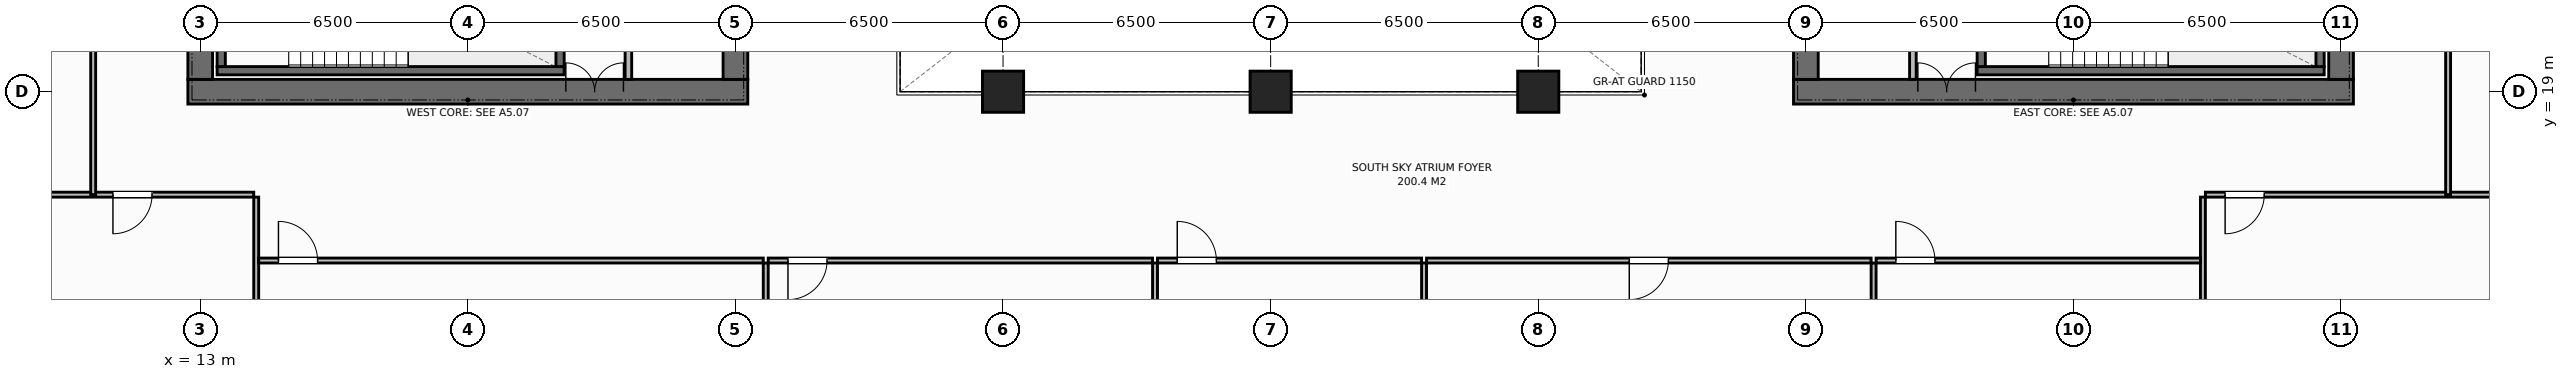
"""IFC4 building model, lengths in metres.
Left out: names, types, materials, properties, quantities, classifications, styles, units other than length and angle.
Written with IfcOpenShell. Run it as: python <this file> out.ifc"""

import sys

from ifc_helpers import new_model, si_unit, direction, frame, frame_2d, origin, origin_2d, place, context, subcontext, project, spatial, rectangle, extrude, element, fill, save


model = new_model("IFC4")
c1 = context("Model", 3, precision=1e-05, world=origin(), true_north=direction((0.0, 1.0)))
c2 = subcontext(c1, "Body", "Model", "MODEL_VIEW")
j1 = project(units=[si_unit("LENGTHUNIT", "METRE"), si_unit("PLANEANGLEUNIT", "RADIAN")], contexts=[c1])
p1 = place(None, origin())
s1 = spatial("IfcSite", under=j1, at=p1, CompositionType="ELEMENT")
p2 = place(p1, origin())
s2 = spatial("IfcBuilding", under=s1, at=p2, CompositionType="ELEMENT")
p3 = place(p2, frame((0.0, 0.0, 167.0)))
s3 = spatial("IfcBuildingStorey", under=s2, at=p3, CompositionType="ELEMENT", Elevation=167.0)
p4 = place(p3, frame((12.7, 19.0, 0.0), z_axis=(0.0, 0.0, 1.0), x_axis=(1.0, 0.0, 0.0)))
e1 = element("IfcWall", 1, at=p4, inside=s3, PredefinedType="SHEAR", context=c2, shape_type="SweptSolid", body=[
    extrude(rectangle(XDim=13.6, YDim=0.6, at=frame_2d((6.8, 0.0))), origin(), (0.0, 0.0, 1.0), 3.8),
])
p5 = place(p4, frame((9.18, 0.0, 0.0)))
e2 = element("IfcOpeningElement", 2, at=p5, cuts=e1, PredefinedType="OPENING", context=c2, shape_type="SweptSolid", body=[
    extrude(rectangle(XDim=1.4, YDim=2.2, at=frame_2d((0.7, 1.1))), frame((0.0, 0.31, 0.0), z_axis=(0.0, -1.0, 0.0), x_axis=(1.0, 0.0, 0.0)), (0.0, 0.0, 1.0), 0.62),
])
p6 = place(p3, frame((13.0, 19.3, 0.0), z_axis=(0.0, 0.0, 1.0), x_axis=(0.0, 1.0, 0.0)))
e3 = element("IfcWall", 3, at=p6, inside=s3, PredefinedType="SHEAR", context=c2, shape_type="SweptSolid", body=[
    extrude(rectangle(XDim=13.4, YDim=0.6, at=frame_2d((6.7, 0.0))), origin(), (0.0, 0.0, 1.0), 3.8),
])
p7 = place(p6, frame((4.75, 0.0, 0.0)))
e4 = element("IfcOpeningElement", 4, at=p7, cuts=e3, PredefinedType="OPENING", context=c2, shape_type="SweptSolid", body=[
    extrude(rectangle(XDim=1.4, YDim=2.2, at=frame_2d((0.7, 1.1))), frame((0.0, 0.31, 0.0), z_axis=(0.0, -1.0, 0.0), x_axis=(1.0, 0.0, 0.0)), (0.0, 0.0, 1.0), 0.62),
])
p8 = place(p3, frame((26.0, 19.3, 0.0), z_axis=(0.0, 0.0, 1.0), x_axis=(0.0, 1.0, 0.0)))
e5 = element("IfcWall", 5, at=p8, inside=s3, PredefinedType="SHEAR", context=c2, shape_type="SweptSolid", body=[
    extrude(rectangle(XDim=13.4, YDim=0.6, at=frame_2d((6.7, 0.0))), origin(), (0.0, 0.0, 1.0), 3.8),
])
p9 = place(p3, frame((51.7, 19.0, 0.0), z_axis=(0.0, 0.0, 1.0), x_axis=(1.0, 0.0, 0.0)))
e6 = element("IfcWall", 6, at=p9, inside=s3, PredefinedType="SHEAR", context=c2, shape_type="SweptSolid", body=[
    extrude(rectangle(XDim=13.6, YDim=0.6, at=frame_2d((6.8, 0.0))), origin(), (0.0, 0.0, 1.0), 3.8),
])
p10 = place(p9, frame((3.02, 0.0, 0.0)))
e7 = element("IfcOpeningElement", 7, at=p10, cuts=e6, PredefinedType="OPENING", context=c2, shape_type="SweptSolid", body=[
    extrude(rectangle(XDim=1.4, YDim=2.2, at=frame_2d((0.7, 1.1))), frame((0.0, 0.31, 0.0), z_axis=(0.0, -1.0, 0.0), x_axis=(1.0, 0.0, 0.0)), (0.0, 0.0, 1.0), 0.62),
])
p11 = place(p3, frame((52.0, 19.3, 0.0), z_axis=(0.0, 0.0, 1.0), x_axis=(0.0, 1.0, 0.0)))
e8 = element("IfcWall", 8, at=p11, inside=s3, PredefinedType="SHEAR", context=c2, shape_type="SweptSolid", body=[
    extrude(rectangle(XDim=13.4, YDim=0.6, at=frame_2d((6.7, 0.0))), origin(), (0.0, 0.0, 1.0), 3.8),
])
p12 = place(p3, frame((65.0, 19.3, 0.0), z_axis=(0.0, 0.0, 1.0), x_axis=(0.0, 1.0, 0.0)))
e9 = element("IfcWall", 9, at=p12, inside=s3, PredefinedType="SHEAR", context=c2, shape_type="SweptSolid", body=[
    extrude(rectangle(XDim=13.4, YDim=0.6, at=frame_2d((6.7, 0.0))), origin(), (0.0, 0.0, 1.0), 3.8),
])
p13 = place(p12, frame((8.15, 0.0, 0.0)))
e10 = element("IfcOpeningElement", 10, at=p13, cuts=e9, PredefinedType="OPENING", context=c2, shape_type="SweptSolid", body=[
    extrude(rectangle(XDim=1.3, YDim=2.2, at=frame_2d((0.65, 1.1))), frame((0.0, 0.31, 0.0), z_axis=(0.0, -1.0, 0.0), x_axis=(1.0, 0.0, 0.0)), (0.0, 0.0, 1.0), 0.62),
])
p14 = place(p3, frame((13.41, 19.51, 0.0), z_axis=(0.0, 0.0, 1.0), x_axis=(1.0, 0.0, 0.0)))
e11 = element("IfcWall", 11, at=p14, inside=s3, PredefinedType="SHEAR", context=c2, shape_type="SweptSolid", body=[
    extrude(rectangle(XDim=8.43, YDim=0.2, at=frame_2d((4.215, 0.0))), origin(), (0.0, 0.0, 1.0), 3.8),
])
for number, where, z_axis, x_axis in (
    (12, (13.51, 19.61, 0.0), (0.0, 0.0, 1.0), (0.0, 1.0, 0.0)),
    (13, (21.74, 19.61, 0.0), (0.0, 0.0, 1.0), (0.0, 1.0, 0.0)),
):
    element("IfcWall", number, at=place(p3, frame(where, z_axis=z_axis, x_axis=x_axis)), inside=s3, PredefinedType="SHEAR", context=c2, shape_type="SweptSolid", body=[
        extrude(rectangle(XDim=3.28, YDim=0.2, at=frame_2d((1.64, 0.0))), origin(), (0.0, 0.0, 1.0), 3.8),
    ])
p15 = place(p3, frame((56.16, 19.51, 0.0), z_axis=(0.0, 0.0, 1.0), x_axis=(1.0, 0.0, 0.0)))
e14 = element("IfcWall", 14, at=p15, inside=s3, PredefinedType="SHEAR", context=c2, shape_type="SweptSolid", body=[
    extrude(rectangle(XDim=8.43, YDim=0.2, at=frame_2d((4.215, 0.0))), origin(), (0.0, 0.0, 1.0), 3.8),
])
for number, where, z_axis, x_axis in (
    (15, (56.26, 19.61, 0.0), (0.0, 0.0, 1.0), (0.0, 1.0, 0.0)),
    (16, (64.49, 19.61, 0.0), (0.0, 0.0, 1.0), (0.0, 1.0, 0.0)),
):
    element("IfcWall", number, at=place(p3, frame(where, z_axis=z_axis, x_axis=x_axis)), inside=s3, PredefinedType="SHEAR", context=c2, shape_type="SweptSolid", body=[
        extrude(rectangle(XDim=3.28, YDim=0.2, at=frame_2d((1.64, 0.0))), origin(), (0.0, 0.0, 1.0), 3.8),
    ])
for number, where, z_axis, x_axis in (
    (17, (32.5, 19.0, 0.0), (0.0, 0.0, 1.0), (1.0, 0.0, 0.0)),
    (18, (39.0, 19.0, 0.0), (0.0, 0.0, 1.0), (1.0, 0.0, 0.0)),
    (19, (45.5, 19.0, 0.0), (0.0, 0.0, 1.0), (1.0, 0.0, 0.0)),
):
    element("IfcColumn", number, at=place(p3, frame(where, z_axis=z_axis, x_axis=x_axis)), inside=s3, PredefinedType="COLUMN", context=c2, shape_type="SweptSolid", body=[
        extrude(rectangle(XDim=1.0, YDim=1.0, at=origin_2d()), origin(), (0.0, 0.0, 1.0), 3.8),
    ])
p16 = place(p3, frame((23.4, 19.3, 0.0), z_axis=(0.0, 0.0, 1.0), x_axis=(0.0, 1.0, 0.0)))
e20 = element("IfcWall", 20, at=p16, inside=s3, PredefinedType="STANDARD", context=c2, shape_type="SweptSolid", body=[
    extrude(rectangle(XDim=13.4, YDim=0.16, at=frame_2d((6.7, 0.0))), origin(), (0.0, 0.0, 1.0), 3.572),
])
p17 = place(p16, frame((2.2, 0.0, 0.0)))
e21 = element("IfcOpeningElement", 21, at=p17, cuts=e20, PredefinedType="OPENING", context=c2, shape_type="SweptSolid", body=[
    extrude(rectangle(XDim=0.95, YDim=2.15, at=frame_2d((0.475, 1.075))), frame((0.0, 0.09, 0.0), z_axis=(0.0, -1.0, 0.0), x_axis=(1.0, 0.0, 0.0)), (0.0, 0.0, 1.0), 0.18),
])
p18 = place(p16, frame((6.3, 0.0, 0.0)))
e22 = element("IfcOpeningElement", 22, at=p18, cuts=e20, PredefinedType="OPENING", context=c2, shape_type="SweptSolid", body=[
    extrude(rectangle(XDim=0.95, YDim=2.15, at=frame_2d((0.475, 1.075))), frame((0.0, 0.09, 0.0), z_axis=(0.0, -1.0, 0.0), x_axis=(1.0, 0.0, 0.0)), (0.0, 0.0, 1.0), 0.18),
])
p19 = place(p16, frame((9.3, 0.0, 0.0)))
e23 = element("IfcOpeningElement", 23, at=p19, cuts=e20, PredefinedType="OPENING", context=c2, shape_type="SweptSolid", body=[
    extrude(rectangle(XDim=1.1, YDim=2.2, at=frame_2d((0.55, 1.1))), frame((0.0, 0.09, 0.0), z_axis=(0.0, -1.0, 0.0), x_axis=(1.0, 0.0, 0.0)), (0.0, 0.0, 1.0), 0.18),
])
p20 = place(p16, frame((11.5, 0.0, 0.0)))
e24 = element("IfcOpeningElement", 24, at=p20, cuts=e20, PredefinedType="OPENING", context=c2, shape_type="SweptSolid", body=[
    extrude(rectangle(XDim=1.1, YDim=2.2, at=frame_2d((0.55, 1.1))), frame((0.0, 0.09, 0.0), z_axis=(0.0, -1.0, 0.0), x_axis=(1.0, 0.0, 0.0)), (0.0, 0.0, 1.0), 0.18),
])
p21 = place(p3, frame((54.6, 19.3, 0.0), z_axis=(0.0, 0.0, 1.0), x_axis=(0.0, 1.0, 0.0)))
e25 = element("IfcWall", 25, at=p21, inside=s3, PredefinedType="STANDARD", context=c2, shape_type="SweptSolid", body=[
    extrude(rectangle(XDim=13.4, YDim=0.16, at=frame_2d((6.7, 0.0))), origin(), (0.0, 0.0, 1.0), 3.572),
])
p22 = place(p21, frame((2.1, 0.0, 0.0)))
e26 = element("IfcOpeningElement", 26, at=p22, cuts=e25, PredefinedType="OPENING", context=c2, shape_type="SweptSolid", body=[
    extrude(rectangle(XDim=0.95, YDim=2.15, at=frame_2d((0.475, 1.075))), frame((0.0, 0.09, 0.0), z_axis=(0.0, -1.0, 0.0), x_axis=(1.0, 0.0, 0.0)), (0.0, 0.0, 1.0), 0.18),
])
p23 = place(p21, frame((6.2, 0.0, 0.0)))
e27 = element("IfcOpeningElement", 27, at=p23, cuts=e25, PredefinedType="OPENING", context=c2, shape_type="SweptSolid", body=[
    extrude(rectangle(XDim=0.95, YDim=2.15, at=frame_2d((0.475, 1.075))), frame((0.0, 0.09, 0.0), z_axis=(0.0, -1.0, 0.0), x_axis=(1.0, 0.0, 0.0)), (0.0, 0.0, 1.0), 0.18),
])
p24 = place(p21, frame((9.3, 0.0, 0.0)))
e28 = element("IfcOpeningElement", 28, at=p24, cuts=e25, PredefinedType="OPENING", context=c2, shape_type="SweptSolid", body=[
    extrude(rectangle(XDim=1.1, YDim=2.2, at=frame_2d((0.55, 1.1))), frame((0.0, 0.09, 0.0), z_axis=(0.0, -1.0, 0.0), x_axis=(1.0, 0.0, 0.0)), (0.0, 0.0, 1.0), 0.18),
])
p25 = place(p21, frame((11.5, 0.0, 0.0)))
e29 = element("IfcOpeningElement", 29, at=p25, cuts=e25, PredefinedType="OPENING", context=c2, shape_type="SweptSolid", body=[
    extrude(rectangle(XDim=1.1, YDim=2.2, at=frame_2d((0.55, 1.1))), frame((0.0, 0.09, 0.0), z_axis=(0.0, -1.0, 0.0), x_axis=(1.0, 0.0, 0.0)), (0.0, 0.0, 1.0), 0.18),
])
p26 = place(p3, frame((14.36, 3.42, 0.0), z_axis=(0.0, 0.0, 1.0), x_axis=(0.0, 1.0, 0.0)))
e30 = element("IfcWall", 30, at=p26, inside=s3, PredefinedType="PARTITIONING", context=c2, shape_type="SweptSolid", body=[
    extrude(rectangle(XDim=13.02, YDim=0.12, at=frame_2d((6.51, 0.0))), origin(), (0.0, 0.0, 1.0), 3.572),
])
p27 = place(p3, frame((3.98, 16.5, 0.0), z_axis=(0.0, 0.0, 1.0), x_axis=(1.0, 0.0, 0.0)))
e31 = element("IfcWall", 31, at=p27, inside=s3, PredefinedType="PARTITIONING", context=c2, shape_type="SweptSolid", body=[
    extrude(rectangle(XDim=10.32, YDim=0.12, at=frame_2d((5.16, 0.0))), origin(), (0.0, 0.0, 1.0), 3.572),
])
p28 = place(p27, frame((6.9, 0.0, 0.0)))
e32 = element("IfcOpeningElement", 32, at=p28, cuts=e31, PredefinedType="OPENING", context=c2, shape_type="SweptSolid", body=[
    extrude(rectangle(XDim=0.95, YDim=2.15, at=frame_2d((0.475, 1.075))), frame((0.0, 0.07, 0.0), z_axis=(0.0, -1.0, 0.0), x_axis=(1.0, 0.0, 0.0)), (0.0, 0.0, 1.0), 0.14),
])
p29 = place(p3, frame((26.736, 3.42, 0.0), z_axis=(0.0, 0.0, 1.0), x_axis=(0.0, 1.0, 0.0)))
e33 = element("IfcWall", 33, at=p29, inside=s3, PredefinedType="PARTITIONING", context=c2, shape_type="SweptSolid", body=[
    extrude(rectangle(XDim=11.42, YDim=0.12, at=frame_2d((5.71, 0.0))), origin(), (0.0, 0.0, 1.0), 3.572),
])
p30 = place(p3, frame((14.42, 14.9, 0.0), z_axis=(0.0, 0.0, 1.0), x_axis=(1.0, 0.0, 0.0)))
e34 = element("IfcWall", 34, at=p30, inside=s3, PredefinedType="PARTITIONING", context=c2, shape_type="SweptSolid", body=[
    extrude(rectangle(XDim=12.256, YDim=0.12, at=frame_2d((6.128, 0.0))), origin(), (0.0, 0.0, 1.0), 3.572),
])
p31 = place(p30, frame((0.48, 0.0, 0.0)))
e35 = element("IfcOpeningElement", 35, at=p31, cuts=e34, PredefinedType="OPENING", context=c2, shape_type="SweptSolid", body=[
    extrude(rectangle(XDim=0.95, YDim=2.15, at=frame_2d((0.475, 1.075))), frame((0.0, 0.07, 0.0), z_axis=(0.0, -1.0, 0.0), x_axis=(1.0, 0.0, 0.0)), (0.0, 0.0, 1.0), 0.14),
])
p32 = place(p3, frame((36.191, 3.42, 0.0), z_axis=(0.0, 0.0, 1.0), x_axis=(0.0, 1.0, 0.0)))
e36 = element("IfcWall", 36, at=p32, inside=s3, PredefinedType="PARTITIONING", context=c2, shape_type="SweptSolid", body=[
    extrude(rectangle(XDim=11.42, YDim=0.12, at=frame_2d((5.71, 0.0))), origin(), (0.0, 0.0, 1.0), 3.572),
])
p33 = place(p3, frame((26.796, 14.9, 0.0), z_axis=(0.0, 0.0, 1.0), x_axis=(1.0, 0.0, 0.0)))
e37 = element("IfcWall", 37, at=p33, inside=s3, PredefinedType="PARTITIONING", context=c2, shape_type="SweptSolid", body=[
    extrude(rectangle(XDim=9.335, YDim=0.12, at=frame_2d((4.668, 0.0))), origin(), (0.0, 0.0, 1.0), 3.572),
])
p34 = place(p33, frame((0.48, 0.0, 0.0)))
e38 = element("IfcOpeningElement", 38, at=p34, cuts=e37, PredefinedType="OPENING", context=c2, shape_type="SweptSolid", body=[
    extrude(rectangle(XDim=0.95, YDim=2.15, at=frame_2d((0.475, 1.075))), frame((0.0, 0.07, 0.0), z_axis=(0.0, -1.0, 0.0), x_axis=(1.0, 0.0, 0.0)), (0.0, 0.0, 1.0), 0.14),
])
p35 = place(p3, frame((42.726, 3.42, 0.0), z_axis=(0.0, 0.0, 1.0), x_axis=(0.0, 1.0, 0.0)))
e39 = element("IfcWall", 39, at=p35, inside=s3, PredefinedType="PARTITIONING", context=c2, shape_type="SweptSolid", body=[
    extrude(rectangle(XDim=11.42, YDim=0.12, at=frame_2d((5.71, 0.0))), origin(), (0.0, 0.0, 1.0), 3.572),
])
p36 = place(p3, frame((36.251, 14.9, 0.0), z_axis=(0.0, 0.0, 1.0), x_axis=(1.0, 0.0, 0.0)))
e40 = element("IfcWall", 40, at=p36, inside=s3, PredefinedType="PARTITIONING", context=c2, shape_type="SweptSolid", body=[
    extrude(rectangle(XDim=6.415, YDim=0.12, at=frame_2d((3.207, 0.0))), origin(), (0.0, 0.0, 1.0), 3.572),
])
p37 = place(p36, frame((0.48, 0.0, 0.0)))
e41 = element("IfcOpeningElement", 41, at=p37, cuts=e40, PredefinedType="OPENING", context=c2, shape_type="SweptSolid", body=[
    extrude(rectangle(XDim=0.95, YDim=2.15, at=frame_2d((0.475, 1.075))), frame((0.0, 0.07, 0.0), z_axis=(0.0, -1.0, 0.0), x_axis=(1.0, 0.0, 0.0)), (0.0, 0.0, 1.0), 0.14),
])
p38 = place(p3, frame((53.646, 3.42, 0.0), z_axis=(0.0, 0.0, 1.0), x_axis=(0.0, 1.0, 0.0)))
e42 = element("IfcWall", 42, at=p38, inside=s3, PredefinedType="PARTITIONING", context=c2, shape_type="SweptSolid", body=[
    extrude(rectangle(XDim=11.42, YDim=0.12, at=frame_2d((5.71, 0.0))), origin(), (0.0, 0.0, 1.0), 3.572),
])
p39 = place(p3, frame((42.786, 14.9, 0.0), z_axis=(0.0, 0.0, 1.0), x_axis=(1.0, 0.0, 0.0)))
e43 = element("IfcWall", 43, at=p39, inside=s3, PredefinedType="PARTITIONING", context=c2, shape_type="SweptSolid", body=[
    extrude(rectangle(XDim=10.799, YDim=0.12, at=frame_2d((5.4, 0.0))), origin(), (0.0, 0.0, 1.0), 3.572),
])
p40 = place(p39, frame((4.925, 0.0, 0.0)))
e44 = element("IfcOpeningElement", 44, at=p40, cuts=e43, PredefinedType="OPENING", context=c2, shape_type="SweptSolid", body=[
    extrude(rectangle(XDim=0.95, YDim=2.15, at=frame_2d((0.475, 1.075))), frame((0.0, 0.07, 0.0), z_axis=(0.0, -1.0, 0.0), x_axis=(1.0, 0.0, 0.0)), (0.0, 0.0, 1.0), 0.14),
])
p41 = place(p3, frame((61.644, 3.42, 0.0), z_axis=(0.0, 0.0, 1.0), x_axis=(0.0, 1.0, 0.0)))
e45 = element("IfcWall", 45, at=p41, inside=s3, PredefinedType="PARTITIONING", context=c2, shape_type="SweptSolid", body=[
    extrude(rectangle(XDim=13.02, YDim=0.12, at=frame_2d((6.51, 0.0))), origin(), (0.0, 0.0, 1.0), 3.572),
])
p42 = place(p3, frame((53.705, 14.9, 0.0), z_axis=(0.0, 0.0, 1.0), x_axis=(1.0, 0.0, 0.0)))
e46 = element("IfcWall", 46, at=p42, inside=s3, PredefinedType="PARTITIONING", context=c2, shape_type="SweptSolid", body=[
    extrude(rectangle(XDim=7.879, YDim=0.12, at=frame_2d((3.939, 0.0))), origin(), (0.0, 0.0, 1.0), 3.572),
])
p43 = place(p42, frame((0.48, 0.0, 0.0)))
e47 = element("IfcOpeningElement", 47, at=p43, cuts=e46, PredefinedType="OPENING", context=c2, shape_type="SweptSolid", body=[
    extrude(rectangle(XDim=0.95, YDim=2.15, at=frame_2d((0.475, 1.075))), frame((0.0, 0.07, 0.0), z_axis=(0.0, -1.0, 0.0), x_axis=(1.0, 0.0, 0.0)), (0.0, 0.0, 1.0), 0.14),
])
p44 = place(p3, frame((61.704, 16.5, 0.0), z_axis=(0.0, 0.0, 1.0), x_axis=(1.0, 0.0, 0.0)))
e48 = element("IfcWall", 48, at=p44, inside=s3, PredefinedType="PARTITIONING", context=c2, shape_type="SweptSolid", body=[
    extrude(rectangle(XDim=12.316, YDim=0.12, at=frame_2d((6.158, 0.0))), origin(), (0.0, 0.0, 1.0), 3.572),
])
p45 = place(p44, frame((0.48, 0.0, 0.0)))
e49 = element("IfcOpeningElement", 49, at=p45, cuts=e48, PredefinedType="OPENING", context=c2, shape_type="SweptSolid", body=[
    extrude(rectangle(XDim=0.95, YDim=2.15, at=frame_2d((0.475, 1.075))), frame((0.0, 0.07, 0.0), z_axis=(0.0, -1.0, 0.0), x_axis=(1.0, 0.0, 0.0)), (0.0, 0.0, 1.0), 0.14),
])
p46 = place(p3, frame((10.4, 16.5, 0.0), z_axis=(0.0, 0.0, 1.0), x_axis=(0.0, 1.0, 0.0)))
e50 = element("IfcWall", 50, at=p46, inside=s3, PredefinedType="PARTITIONING", context=c2, shape_type="SweptSolid", body=[
    extrude(rectangle(XDim=19.0, YDim=0.12, at=frame_2d((9.5, 0.0))), origin(), (0.0, 0.0, 1.0), 3.572),
])
p47 = place(p46, frame((9.025, 0.0, 0.0)))
e51 = element("IfcOpeningElement", 51, at=p47, cuts=e50, PredefinedType="OPENING", context=c2, shape_type="SweptSolid", body=[
    extrude(rectangle(XDim=0.95, YDim=2.15, at=frame_2d((0.475, 1.075))), frame((0.0, 0.07, 0.0), z_axis=(0.0, -1.0, 0.0), x_axis=(1.0, 0.0, 0.0)), (0.0, 0.0, 1.0), 0.14),
])
p48 = place(p3, frame((67.6, 16.5, 0.0), z_axis=(0.0, 0.0, 1.0), x_axis=(0.0, 1.0, 0.0)))
e52 = element("IfcWall", 52, at=p48, inside=s3, PredefinedType="PARTITIONING", context=c2, shape_type="SweptSolid", body=[
    extrude(rectangle(XDim=9.5, YDim=0.12, at=frame_2d((4.75, 0.0))), origin(), (0.0, 0.0, 1.0), 3.572),
])
p49 = place(p48, frame((5.325, 0.0, 0.0)))
e53 = element("IfcOpeningElement", 53, at=p49, cuts=e52, PredefinedType="OPENING", context=c2, shape_type="SweptSolid", body=[
    extrude(rectangle(XDim=0.95, YDim=2.15, at=frame_2d((0.475, 1.075))), frame((0.0, 0.07, 0.0), z_axis=(0.0, -1.0, 0.0), x_axis=(1.0, 0.0, 0.0)), (0.0, 0.0, 1.0), 0.14),
])
p50 = place(p5, origin())
e54 = element("IfcDoor", 54, at=p50, inside=s3, OperationType="DOUBLE_DOOR_SINGLE_SWING", PredefinedType="DOOR", context=c2, shape_type="SweptSolid", body=[
    extrude(rectangle(XDim=1.4, YDim=2.2, at=frame_2d((0.7, 1.1))), frame((0.0, 0.075, 0.0), z_axis=(0.0, -1.0, 0.0), x_axis=(1.0, 0.0, 0.0)), (0.0, 0.0, 1.0), 0.05),
])
fill(e2, e54)
p51 = place(p10, origin())
e55 = element("IfcDoor", 55, at=p51, inside=s3, OperationType="DOUBLE_DOOR_SINGLE_SWING", PredefinedType="DOOR", context=c2, shape_type="SweptSolid", body=[
    extrude(rectangle(XDim=1.4, YDim=2.2, at=frame_2d((0.7, 1.1))), frame((0.0, 0.075, 0.0), z_axis=(0.0, -1.0, 0.0), x_axis=(1.0, 0.0, 0.0)), (0.0, 0.0, 1.0), 0.05),
])
fill(e7, e55)
p52 = place(p28, origin())
e56 = element("IfcDoor", 56, at=p52, inside=s3, OperationType="SINGLE_SWING_RIGHT", PredefinedType="DOOR", context=c2, shape_type="SweptSolid", body=[
    extrude(rectangle(XDim=0.95, YDim=2.15, at=frame_2d((0.475, 1.075))), frame((0.0, 0.025, 0.0), z_axis=(0.0, -1.0, 0.0), x_axis=(1.0, 0.0, 0.0)), (0.0, 0.0, 1.0), 0.05),
])
fill(e32, e56)
p53 = place(p31, origin())
e57 = element("IfcDoor", 57, at=p53, inside=s3, OperationType="SINGLE_SWING_LEFT", PredefinedType="DOOR", context=c2, shape_type="SweptSolid", body=[
    extrude(rectangle(XDim=0.95, YDim=2.15, at=frame_2d((0.475, 1.075))), frame((0.0, 0.025, 0.0), z_axis=(0.0, -1.0, 0.0), x_axis=(1.0, 0.0, 0.0)), (0.0, 0.0, 1.0), 0.05),
])
fill(e35, e57)
p54 = place(p34, origin())
e58 = element("IfcDoor", 58, at=p54, inside=s3, OperationType="SINGLE_SWING_RIGHT", PredefinedType="DOOR", context=c2, shape_type="SweptSolid", body=[
    extrude(rectangle(XDim=0.95, YDim=2.15, at=frame_2d((0.475, 1.075))), frame((0.0, 0.025, 0.0), z_axis=(0.0, -1.0, 0.0), x_axis=(1.0, 0.0, 0.0)), (0.0, 0.0, 1.0), 0.05),
])
fill(e38, e58)
p55 = place(p37, origin())
e59 = element("IfcDoor", 59, at=p55, inside=s3, OperationType="SINGLE_SWING_LEFT", PredefinedType="DOOR", context=c2, shape_type="SweptSolid", body=[
    extrude(rectangle(XDim=0.95, YDim=2.15, at=frame_2d((0.475, 1.075))), frame((0.0, 0.025, 0.0), z_axis=(0.0, -1.0, 0.0), x_axis=(1.0, 0.0, 0.0)), (0.0, 0.0, 1.0), 0.05),
])
fill(e41, e59)
p56 = place(p40, origin())
e60 = element("IfcDoor", 60, at=p56, inside=s3, OperationType="SINGLE_SWING_RIGHT", PredefinedType="DOOR", context=c2, shape_type="SweptSolid", body=[
    extrude(rectangle(XDim=0.95, YDim=2.15, at=frame_2d((0.475, 1.075))), frame((0.0, 0.025, 0.0), z_axis=(0.0, -1.0, 0.0), x_axis=(1.0, 0.0, 0.0)), (0.0, 0.0, 1.0), 0.05),
])
fill(e44, e60)
p57 = place(p43, origin())
e61 = element("IfcDoor", 61, at=p57, inside=s3, OperationType="SINGLE_SWING_LEFT", PredefinedType="DOOR", context=c2, shape_type="SweptSolid", body=[
    extrude(rectangle(XDim=0.95, YDim=2.15, at=frame_2d((0.475, 1.075))), frame((0.0, 0.025, 0.0), z_axis=(0.0, -1.0, 0.0), x_axis=(1.0, 0.0, 0.0)), (0.0, 0.0, 1.0), 0.05),
])
fill(e47, e61)
p58 = place(p45, origin())
e62 = element("IfcDoor", 62, at=p58, inside=s3, OperationType="SINGLE_SWING_RIGHT", PredefinedType="DOOR", context=c2, shape_type="SweptSolid", body=[
    extrude(rectangle(XDim=0.95, YDim=2.15, at=frame_2d((0.475, 1.075))), frame((0.0, 0.025, 0.0), z_axis=(0.0, -1.0, 0.0), x_axis=(1.0, 0.0, 0.0)), (0.0, 0.0, 1.0), 0.05),
])
fill(e49, e62)
save(model, sys.argv[1])
